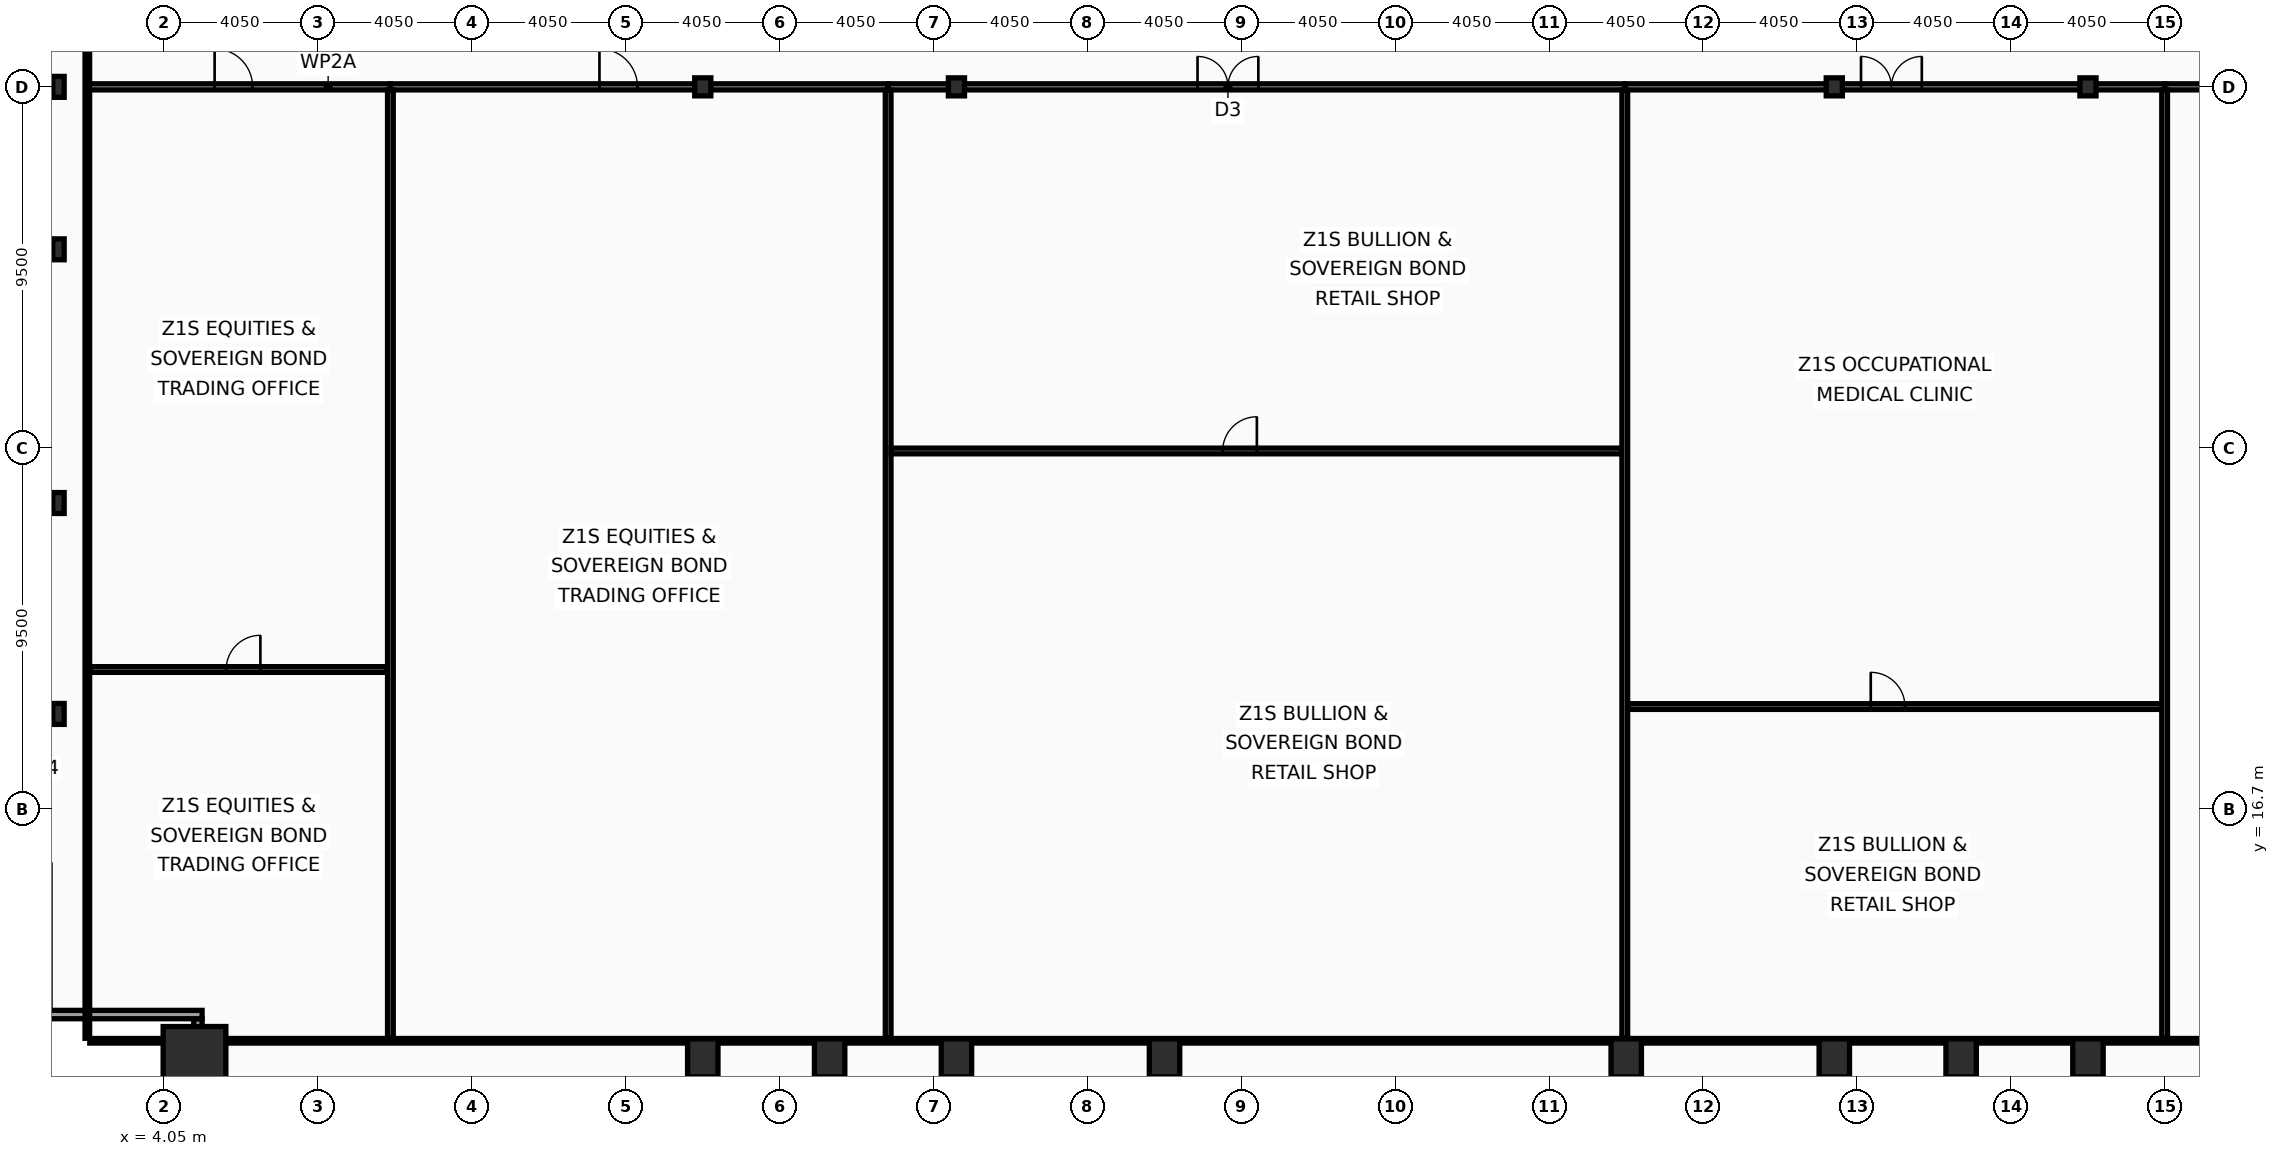
"""IFC4 building model, lengths in metres.
Left out: names, types, materials, properties, quantities, classifications, styles, units other than length and angle.
Written with IfcOpenShell. Run it as: python <this file> out.ifc"""

import sys

from ifc_helpers import new_model, si_unit, direction, frame, frame_2d, origin, origin_2d, place, context, subcontext, project, spatial, rectangle, hollow_rectangle, i_section, extrude, element, fill, save


model = new_model("IFC4")
c1 = context("Model", 3, precision=1e-05, world=origin(), true_north=direction((0.0, 1.0)))
c2 = subcontext(c1, "Body", "Model", "MODEL_VIEW")
j1 = project(units=[si_unit("LENGTHUNIT", "METRE"), si_unit("PLANEANGLEUNIT", "RADIAN")], contexts=[c1])
p1 = place(None, origin())
s1 = spatial("IfcSite", under=j1, at=p1, CompositionType="ELEMENT")
p2 = place(p1, origin())
s2 = spatial("IfcBuilding", under=s1, at=p2, CompositionType="ELEMENT")
p3 = place(p2, frame((0.0, 0.0, 29.8)))
s3 = spatial("IfcBuildingStorey", under=s2, at=p3, CompositionType="ELEMENT", Elevation=29.8)
p4 = place(p3, frame((4.85, 10.15, 0.0), z_axis=(0.0, 0.0, 1.0), x_axis=(1.0, 0.0, 0.0)))
e1 = element("IfcColumn", 1, at=p4, inside=s3, PredefinedType="COLUMN", context=c2, shape_type="SweptSolid", body=[
    extrude(hollow_rectangle(XDim=1.65, YDim=1.65, WallThickness=0.075, at=origin_2d()), origin(), (0.0, 0.0, 1.0), 4.0),
])
for number, where, z_axis, x_axis in (
    (2, (18.225, 10.15, 0.0), (0.0, 0.0, 1.0), (1.0, 0.0, 0.0)),
    (3, (21.562, 10.15, 0.0), (0.0, 0.0, 1.0), (1.0, 0.0, 0.0)),
    (4, (24.9, 10.15, 0.0), (0.0, 0.0, 1.0), (1.0, 0.0, 0.0)),
    (5, (30.375, 10.15, 0.0), (0.0, 0.0, 1.0), (1.0, 0.0, 0.0)),
    (6, (42.525, 10.15, 0.0), (0.0, 0.0, 1.0), (1.0, 0.0, 0.0)),
    (7, (48.0, 10.15, 0.0), (0.0, 0.0, 1.0), (1.0, 0.0, 0.0)),
    (8, (51.337, 10.15, 0.0), (0.0, 0.0, 1.0), (1.0, 0.0, 0.0)),
    (9, (54.675, 10.15, 0.0), (0.0, 0.0, 1.0), (1.0, 0.0, 0.0)),
):
    element("IfcColumn", number, at=place(p3, frame(where, z_axis=z_axis, x_axis=x_axis)), inside=s3, PredefinedType="COLUMN", context=c2, shape_type="SweptSolid", body=[
        extrude(hollow_rectangle(XDim=0.8, YDim=1.0, WallThickness=0.055, at=origin_2d()), origin(), (0.0, 0.0, 1.0), 4.0),
    ])
for number, where, z_axis, x_axis in (
    (10, (1.27, 19.2, 0.0), (0.0, 0.0, 1.0), (1.0, 0.0, 0.0)),
    (11, (1.27, 24.75, 0.0), (0.0, 0.0, 1.0), (1.0, 0.0, 0.0)),
    (12, (1.27, 31.425, 0.0), (0.0, 0.0, 1.0), (1.0, 0.0, 0.0)),
    (13, (1.27, 35.7, 0.0), (0.0, 0.0, 1.0), (1.0, 0.0, 0.0)),
):
    element("IfcColumn", number, at=place(p3, frame(where, z_axis=z_axis, x_axis=x_axis)), inside=s3, PredefinedType="COLUMN", context=c2, shape_type="SweptSolid", body=[
        extrude(i_section(OverallWidth=0.3, OverallDepth=0.55, WebThickness=0.015, FlangeThickness=0.029, at=origin_2d()), origin(), (0.0, 0.0, 1.0), 4.0),
    ])
for number, where, z_axis, x_axis in (
    (14, (18.225, 35.7, 0.0), (0.0, 0.0, 1.0), (1.0, 0.0, 0.0)),
    (15, (24.9, 35.7, 0.0), (0.0, 0.0, 1.0), (1.0, 0.0, 0.0)),
    (16, (48.0, 35.7, 0.0), (0.0, 0.0, 1.0), (1.0, 0.0, 0.0)),
    (17, (54.675, 35.7, 0.0), (0.0, 0.0, 1.0), (1.0, 0.0, 0.0)),
):
    element("IfcColumn", number, at=place(p3, frame(where, z_axis=z_axis, x_axis=x_axis)), inside=s3, PredefinedType="COLUMN", context=c2, shape_type="SweptSolid", body=[
        extrude(i_section(OverallWidth=0.424, OverallDepth=0.474, WebThickness=0.048, FlangeThickness=0.077, at=origin_2d()), origin(), (0.0, 0.0, 1.0), 4.0),
    ])
p5 = place(p3, frame((4.94, 7.27, 0.0), z_axis=(0.0, 0.0, 1.0), x_axis=(0.0, 1.0, 0.0)))
e18 = element("IfcWall", 18, at=p5, inside=s3, PredefinedType="SOLIDWALL", context=c2, shape_type="SweptSolid", body=[
    extrude(rectangle(XDim=3.91, YDim=0.22, at=frame_2d((1.955, 0.0))), origin(), (0.0, 0.0, 1.0), 3.16),
])
p6 = place(p3, frame((5.05, 11.29, 0.0), z_axis=(0.0, 0.0, 1.0), x_axis=(-1.0, 0.0, 0.0)))
e19 = element("IfcWall", 19, at=p6, inside=s3, PredefinedType="SOLIDWALL", context=c2, shape_type="SweptSolid", body=[
    extrude(rectangle(XDim=4.22, YDim=0.22, at=frame_2d((2.11, 0.0))), origin(), (0.0, 0.0, 1.0), 3.16),
])
p7 = place(p3, frame((2.03, 35.7, 0.0), z_axis=(0.0, 0.0, 1.0), x_axis=(1.0, 0.0, 0.0)))
e20 = element("IfcWall", 20, at=p7, inside=s3, PredefinedType="PARTITIONING", context=c2, shape_type="SweptSolid", body=[
    extrude(rectangle(XDim=7.975, YDim=0.16, at=frame_2d((3.987, 0.0))), origin(), (0.0, 0.0, 1.0), 3.01),
])
p8 = place(p7, frame((3.35, 0.0, 0.0)))
e21 = element("IfcOpeningElement", 21, at=p8, cuts=e20, PredefinedType="OPENING", context=c2, shape_type="SweptSolid", body=[
    extrude(rectangle(XDim=1.0, YDim=2.05, at=frame_2d((0.5, 1.025))), frame((0.0, 0.09, 0.0), z_axis=(0.0, -1.0, 0.0), x_axis=(1.0, 0.0, 0.0)), (0.0, 0.0, 1.0), 0.18),
])
p9 = place(p3, frame((2.095, 20.369, 0.0), z_axis=(0.0, 0.0, 1.0), x_axis=(1.0, 0.0, 0.0)))
e22 = element("IfcWall", 22, at=p9, inside=s3, PredefinedType="PARTITIONING", context=c2, shape_type="SweptSolid", body=[
    extrude(rectangle(XDim=7.83, YDim=0.15, at=frame_2d((3.915, 0.0))), origin(), (0.0, 0.0, 1.0), 3.82),
])
p10 = place(p9, frame((3.589, 0.0, 0.0)))
e23 = element("IfcOpeningElement", 23, at=p10, cuts=e22, PredefinedType="OPENING", context=c2, shape_type="SweptSolid", body=[
    extrude(rectangle(XDim=0.9, YDim=2.05, at=frame_2d((0.45, 1.025))), frame((0.0, 0.085, 0.0), z_axis=(0.0, -1.0, 0.0), x_axis=(1.0, 0.0, 0.0)), (0.0, 0.0, 1.0), 0.17),
])
p11 = place(p3, frame((10.005, 35.7, 0.0), z_axis=(0.0, 0.0, 1.0), x_axis=(1.0, 0.0, 0.0)))
e24 = element("IfcWall", 24, at=p11, inside=s3, PredefinedType="PARTITIONING", context=c2, shape_type="SweptSolid", body=[
    extrude(rectangle(XDim=13.098, YDim=0.16, at=frame_2d((6.549, 0.0))), origin(), (0.0, 0.0, 1.0), 3.01),
])
p12 = place(p11, frame((5.501, 0.0, 0.0)))
e25 = element("IfcOpeningElement", 25, at=p12, cuts=e24, PredefinedType="OPENING", context=c2, shape_type="SweptSolid", body=[
    extrude(rectangle(XDim=1.0, YDim=2.05, at=frame_2d((0.5, 1.025))), frame((0.0, 0.09, 0.0), z_axis=(0.0, -1.0, 0.0), x_axis=(1.0, 0.0, 0.0)), (0.0, 0.0, 1.0), 0.18),
])
p13 = place(p3, frame((10.005, 10.665, 0.0), z_axis=(0.0, 0.0, 1.0), x_axis=(0.0, 1.0, 0.0)))
e26 = element("IfcWall", 26, at=p13, inside=s3, PredefinedType="PARTITIONING", context=c2, shape_type="SweptSolid", body=[
    extrude(rectangle(XDim=24.95, YDim=0.15, at=frame_2d((12.475, 0.0))), origin(), (0.0, 0.0, 1.0), 3.01),
])
p14 = place(p3, frame((23.103, 35.7, 0.0), z_axis=(0.0, 0.0, 1.0), x_axis=(1.0, 0.0, 0.0)))
e27 = element("IfcWall", 27, at=p14, inside=s3, PredefinedType="PARTITIONING", context=c2, shape_type="SweptSolid", body=[
    extrude(rectangle(XDim=19.384, YDim=0.16, at=frame_2d((9.692, 0.0))), origin(), (0.0, 0.0, 1.0), 3.01),
])
p15 = place(p14, frame((8.141, 0.0, 0.0)))
e28 = element("IfcOpeningElement", 28, at=p15, cuts=e27, PredefinedType="OPENING", context=c2, shape_type="SweptSolid", body=[
    extrude(rectangle(XDim=1.6, YDim=2.15, at=frame_2d((0.8, 1.075))), frame((0.0, 0.09, 0.0), z_axis=(0.0, -1.0, 0.0), x_axis=(1.0, 0.0, 0.0)), (0.0, 0.0, 1.0), 0.18),
])
p16 = place(p3, frame((23.103, 10.665, 0.0), z_axis=(0.0, 0.0, 1.0), x_axis=(0.0, 1.0, 0.0)))
e29 = element("IfcWall", 29, at=p16, inside=s3, PredefinedType="PARTITIONING", context=c2, shape_type="SweptSolid", body=[
    extrude(rectangle(XDim=24.95, YDim=0.15, at=frame_2d((12.475, 0.0))), origin(), (0.0, 0.0, 1.0), 3.21),
])
p17 = place(p3, frame((23.183, 26.119, 0.0), z_axis=(0.0, 0.0, 1.0), x_axis=(1.0, 0.0, 0.0)))
e30 = element("IfcWall", 30, at=p17, inside=s3, PredefinedType="PARTITIONING", context=c2, shape_type="SweptSolid", body=[
    extrude(rectangle(XDim=19.224, YDim=0.15, at=frame_2d((9.612, 0.0))), origin(), (0.0, 0.0, 1.0), 3.01),
])
p18 = place(p17, frame((8.723, 0.0, 0.0)))
e31 = element("IfcOpeningElement", 31, at=p18, cuts=e30, PredefinedType="OPENING", context=c2, shape_type="SweptSolid", body=[
    extrude(rectangle(XDim=0.9, YDim=2.05, at=frame_2d((0.45, 1.025))), frame((0.0, 0.085, 0.0), z_axis=(0.0, -1.0, 0.0), x_axis=(1.0, 0.0, 0.0)), (0.0, 0.0, 1.0), 0.17),
])
p19 = place(p3, frame((42.487, 35.7, 0.0), z_axis=(0.0, 0.0, 1.0), x_axis=(1.0, 0.0, 0.0)))
e32 = element("IfcWall", 32, at=p19, inside=s3, PredefinedType="PARTITIONING", context=c2, shape_type="SweptSolid", body=[
    extrude(rectangle(XDim=14.205, YDim=0.16, at=frame_2d((7.103, 0.0))), origin(), (0.0, 0.0, 1.0), 3.01),
])
p20 = place(p19, frame((6.216, 0.0, 0.0)))
e33 = element("IfcOpeningElement", 33, at=p20, cuts=e32, PredefinedType="OPENING", context=c2, shape_type="SweptSolid", body=[
    extrude(rectangle(XDim=1.6, YDim=2.15, at=frame_2d((0.8, 1.075))), frame((0.0, 0.09, 0.0), z_axis=(0.0, -1.0, 0.0), x_axis=(1.0, 0.0, 0.0)), (0.0, 0.0, 1.0), 0.18),
])
p21 = place(p3, frame((42.487, 10.665, 0.0), z_axis=(0.0, 0.0, 1.0), x_axis=(0.0, 1.0, 0.0)))
e34 = element("IfcWall", 34, at=p21, inside=s3, PredefinedType="PARTITIONING", context=c2, shape_type="SweptSolid", body=[
    extrude(rectangle(XDim=24.95, YDim=0.15, at=frame_2d((12.475, 0.0))), origin(), (0.0, 0.0, 1.0), 3.01),
])
p22 = place(p3, frame((42.567, 19.395, 0.0), z_axis=(0.0, 0.0, 1.0), x_axis=(1.0, 0.0, 0.0)))
e35 = element("IfcWall", 35, at=p22, inside=s3, PredefinedType="PARTITIONING", context=c2, shape_type="SweptSolid", body=[
    extrude(rectangle(XDim=14.046, YDim=0.15, at=frame_2d((7.023, 0.0))), origin(), (0.0, 0.0, 1.0), 3.01),
])
p23 = place(p22, frame((6.393, 0.0, 0.0)))
e36 = element("IfcOpeningElement", 36, at=p23, cuts=e35, PredefinedType="OPENING", context=c2, shape_type="SweptSolid", body=[
    extrude(rectangle(XDim=0.9, YDim=2.05, at=frame_2d((0.45, 1.025))), frame((0.0, 0.085, 0.0), z_axis=(0.0, -1.0, 0.0), x_axis=(1.0, 0.0, 0.0)), (0.0, 0.0, 1.0), 0.17),
])
p24 = place(p3, frame((56.692, 35.7, 0.0), z_axis=(0.0, 0.0, 1.0), x_axis=(1.0, 0.0, 0.0)))
e37 = element("IfcWall", 37, at=p24, inside=s3, PredefinedType="PARTITIONING", context=c2, shape_type="SweptSolid", body=[
    extrude(rectangle(XDim=14.178, YDim=0.16, at=frame_2d((7.089, 0.0))), origin(), (0.0, 0.0, 1.0), 3.01),
])
p25 = place(p24, frame((5.955, 0.0, 0.0)))
e38 = element("IfcOpeningElement", 38, at=p25, cuts=e37, PredefinedType="OPENING", context=c2, shape_type="SweptSolid", body=[
    extrude(rectangle(XDim=1.6, YDim=2.15, at=frame_2d((0.8, 1.075))), frame((0.0, 0.09, 0.0), z_axis=(0.0, -1.0, 0.0), x_axis=(1.0, 0.0, 0.0)), (0.0, 0.0, 1.0), 0.18),
])
p26 = place(p3, frame((56.692, 10.665, 0.0), z_axis=(0.0, 0.0, 1.0), x_axis=(0.0, 1.0, 0.0)))
e39 = element("IfcWall", 39, at=p26, inside=s3, PredefinedType="PARTITIONING", context=c2, shape_type="SweptSolid", body=[
    extrude(rectangle(XDim=24.95, YDim=0.15, at=frame_2d((12.475, 0.0))), origin(), (0.0, 0.0, 1.0), 3.01),
])
p27 = place(p3, frame((2.03, 10.665, 0.0), z_axis=(0.0, 0.0, 1.0), x_axis=(0.0, 1.0, 0.0)))
e40 = element("IfcWall", 40, at=p27, inside=s3, PredefinedType="PARTITIONING", context=c2, shape_type="SweptSolid", body=[
    extrude(rectangle(XDim=42.11, YDim=0.12, at=frame_2d((21.055, 0.0))), origin(), (0.0, 0.0, 1.0), 3.01),
])
p28 = place(p3, frame((2.095, 10.6, 0.0), z_axis=(0.0, 0.0, 1.0), x_axis=(1.0, 0.0, 0.0)))
e41 = element("IfcWall", 41, at=p28, inside=s3, PredefinedType="PARTITIONING", context=c2, shape_type="SweptSolid", body=[
    extrude(rectangle(XDim=68.71, YDim=0.12, at=frame_2d((34.355, 0.0))), origin(), (0.0, 0.0, 1.0), 3.01),
])
p29 = place(p8, origin())
e42 = element("IfcDoor", 42, at=p29, inside=s3, OperationType="SINGLE_SWING_LEFT", PredefinedType="DOOR", context=c2, shape_type="SweptSolid", body=[
    extrude(rectangle(XDim=1.0, YDim=2.05, at=frame_2d((0.5, 1.025))), frame((0.0, 0.025, 0.0), z_axis=(0.0, -1.0, 0.0), x_axis=(1.0, 0.0, 0.0)), (0.0, 0.0, 1.0), 0.05),
])
fill(e21, e42)
p30 = place(p10, origin())
e43 = element("IfcDoor", 43, at=p30, inside=s3, OperationType="SINGLE_SWING_RIGHT", PredefinedType="DOOR", context=c2, shape_type="SweptSolid", body=[
    extrude(rectangle(XDim=0.9, YDim=2.05, at=frame_2d((0.45, 1.025))), frame((0.0, 0.025, 0.0), z_axis=(0.0, -1.0, 0.0), x_axis=(1.0, 0.0, 0.0)), (0.0, 0.0, 1.0), 0.05),
])
fill(e23, e43)
p31 = place(p12, origin())
e44 = element("IfcDoor", 44, at=p31, inside=s3, OperationType="SINGLE_SWING_LEFT", PredefinedType="DOOR", context=c2, shape_type="SweptSolid", body=[
    extrude(rectangle(XDim=1.0, YDim=2.05, at=frame_2d((0.5, 1.025))), frame((0.0, 0.025, 0.0), z_axis=(0.0, -1.0, 0.0), x_axis=(1.0, 0.0, 0.0)), (0.0, 0.0, 1.0), 0.05),
])
fill(e25, e44)
p32 = place(p15, origin())
e45 = element("IfcDoor", 45, at=p32, inside=s3, OperationType="DOUBLE_DOOR_SINGLE_SWING", PredefinedType="DOOR", context=c2, shape_type="SweptSolid", body=[
    extrude(rectangle(XDim=1.6, YDim=2.15, at=frame_2d((0.8, 1.075))), frame((0.0, 0.025, 0.0), z_axis=(0.0, -1.0, 0.0), x_axis=(1.0, 0.0, 0.0)), (0.0, 0.0, 1.0), 0.05),
])
fill(e28, e45)
p33 = place(p18, origin())
e46 = element("IfcDoor", 46, at=p33, inside=s3, OperationType="SINGLE_SWING_RIGHT", PredefinedType="DOOR", context=c2, shape_type="SweptSolid", body=[
    extrude(rectangle(XDim=0.9, YDim=2.05, at=frame_2d((0.45, 1.025))), frame((0.0, 0.025, 0.0), z_axis=(0.0, -1.0, 0.0), x_axis=(1.0, 0.0, 0.0)), (0.0, 0.0, 1.0), 0.05),
])
fill(e31, e46)
p34 = place(p20, origin())
e47 = element("IfcDoor", 47, at=p34, inside=s3, OperationType="DOUBLE_DOOR_SINGLE_SWING", PredefinedType="DOOR", context=c2, shape_type="SweptSolid", body=[
    extrude(rectangle(XDim=1.6, YDim=2.15, at=frame_2d((0.8, 1.075))), frame((0.0, 0.025, 0.0), z_axis=(0.0, -1.0, 0.0), x_axis=(1.0, 0.0, 0.0)), (0.0, 0.0, 1.0), 0.05),
])
fill(e33, e47)
p35 = place(p23, origin())
e48 = element("IfcDoor", 48, at=p35, inside=s3, OperationType="SINGLE_SWING_LEFT", PredefinedType="DOOR", context=c2, shape_type="SweptSolid", body=[
    extrude(rectangle(XDim=0.9, YDim=2.05, at=frame_2d((0.45, 1.025))), frame((0.0, 0.025, 0.0), z_axis=(0.0, -1.0, 0.0), x_axis=(1.0, 0.0, 0.0)), (0.0, 0.0, 1.0), 0.05),
])
fill(e36, e48)
save(model, sys.argv[1])
